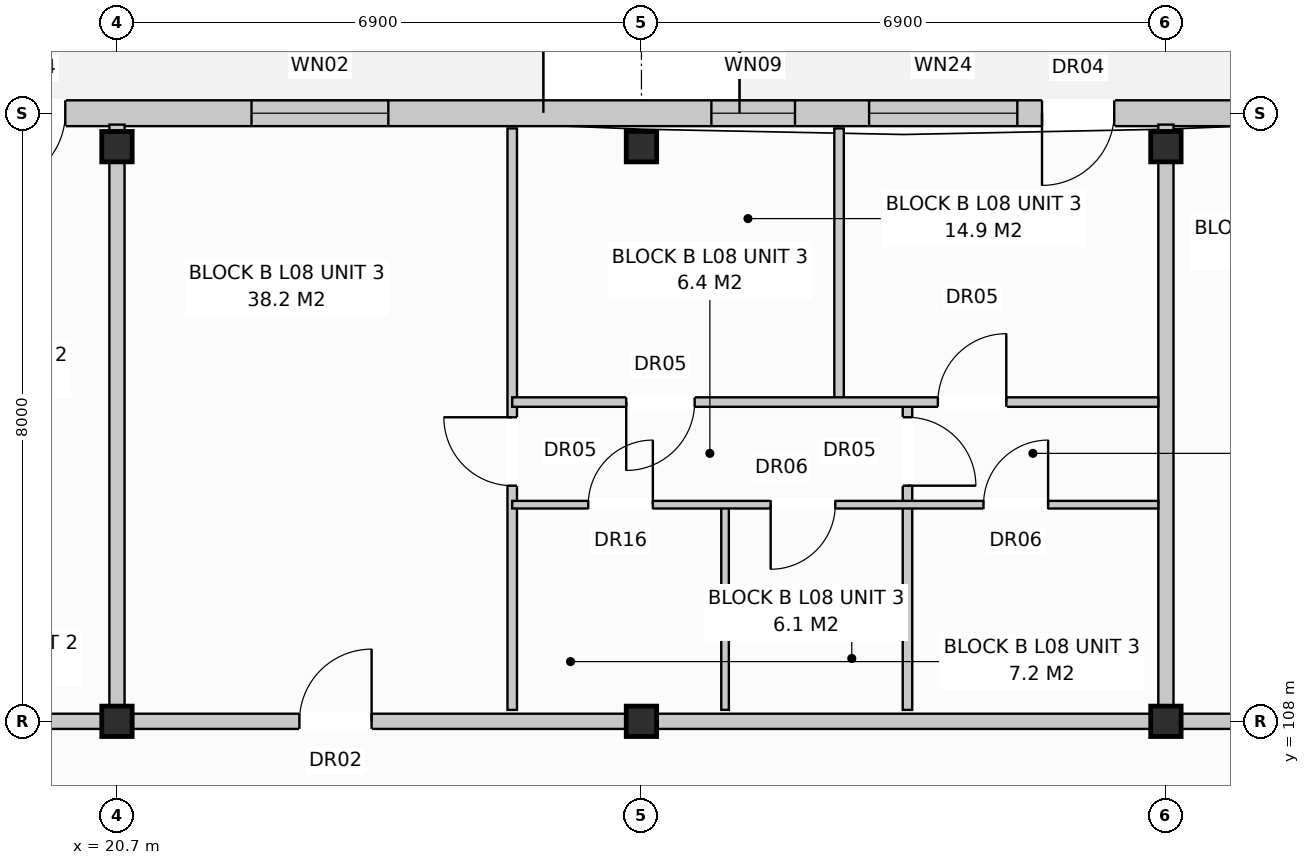
"""IFC4 building model, lengths in metres.
Left out: names, types, materials, properties, quantities, classifications, styles, units other than length and angle.
Written with IfcOpenShell. Run it as: python <this file> out.ifc"""

import sys

from ifc_helpers import new_model, si_unit, direction, frame, frame_2d, origin, origin_with_axes, origin_2d, place, context, subcontext, project, spatial, rectangle, extrude, element, fill, save


model = new_model("IFC4")
c1 = context("Model", 3, precision=1e-05, world=origin(), true_north=direction((0.0, 1.0)))
c2 = subcontext(c1, "Body", "Model", "MODEL_VIEW")
j1 = project(units=[si_unit("LENGTHUNIT", "METRE"), si_unit("PLANEANGLEUNIT", "RADIAN")], contexts=[c1])
p1 = place(None, origin())
s1 = spatial("IfcSite", under=j1, at=p1, CompositionType="ELEMENT")
p2 = place(p1, origin())
s2 = spatial("IfcBuilding", under=s1, at=p2, CompositionType="ELEMENT")
p3 = place(p2, frame((0.0, 0.0, 27.2)))
s3 = spatial("IfcBuildingStorey", under=s2, at=p3, CompositionType="ELEMENT", Elevation=27.2)
for number, where, z_axis, x_axis in (
    (1, (20.7, 108.0, 0.0), (0.0, 0.0, 1.0), (1.0, 0.0, 0.0)),
    (2, (20.7, 115.56, 0.0), (0.0, 0.0, 1.0), (1.0, 0.0, 0.0)),
    (3, (27.6, 108.0, 0.0), (0.0, 0.0, 1.0), (1.0, 0.0, 0.0)),
    (4, (27.6, 115.56, 0.0), (0.0, 0.0, 1.0), (1.0, 0.0, 0.0)),
    (5, (34.5, 108.0, 0.0), (0.0, 0.0, 1.0), (1.0, 0.0, 0.0)),
    (6, (34.5, 115.56, 0.0), (0.0, 0.0, 1.0), (1.0, 0.0, 0.0)),
):
    element("IfcColumn", number, at=place(p3, frame(where, z_axis=z_axis, x_axis=x_axis)), inside=s3, PredefinedType="COLUMN", context=c2, shape_type="SweptSolid", body=[
        extrude(rectangle(XDim=0.4, YDim=0.4, at=origin_2d()), origin(), (0.0, 0.0, 1.0), 3.2),
    ])
p4 = place(p3, frame((0.16, 116.0, 0.0), z_axis=(0.0, 0.0, 1.0), x_axis=(1.0, 0.0, 0.0)))
e7 = element("IfcWall", 7, at=p4, inside=s3, PredefinedType="STANDARD", context=c2, shape_type="SweptSolid", body=[
    extrude(rectangle(XDim=41.08, YDim=0.34, at=frame_2d((20.54, 0.0))), origin(), (0.0, 0.0, 1.0), 2.96),
])
p5 = place(p4, frame((2.5, 0.0, 0.0)))
e8 = element("IfcOpeningElement", 8, at=p5, cuts=e7, PredefinedType="OPENING", context=c2, shape_type="SweptSolid", body=[
    extrude(rectangle(XDim=0.95, YDim=2.1, at=frame_2d((0.475, 1.05))), frame((0.0, 0.182, 0.0), z_axis=(0.0, -1.0, 0.0), x_axis=(1.0, 0.0, 0.0)), (0.0, 0.0, 1.0), 0.364),
])
p6 = place(p4, frame((18.91, 0.0, 0.0)))
e9 = element("IfcOpeningElement", 9, at=p6, cuts=e7, PredefinedType="OPENING", context=c2, shape_type="SweptSolid", body=[
    extrude(rectangle(XDim=0.95, YDim=2.1, at=frame_2d((0.475, 1.05))), frame((0.0, 0.182, 0.0), z_axis=(0.0, -1.0, 0.0), x_axis=(1.0, 0.0, 0.0)), (0.0, 0.0, 1.0), 0.364),
])
p7 = place(p4, frame((32.71, 0.0, 0.0)))
e10 = element("IfcOpeningElement", 10, at=p7, cuts=e7, PredefinedType="OPENING", context=c2, shape_type="SweptSolid", body=[
    extrude(rectangle(XDim=0.95, YDim=2.1, at=frame_2d((0.475, 1.05))), frame((0.0, 0.182, 0.0), z_axis=(0.0, -1.0, 0.0), x_axis=(1.0, 0.0, 0.0)), (0.0, 0.0, 1.0), 0.364),
])
p8 = place(p4, frame((0.81, 0.0, 0.72)))
e11 = element("IfcOpeningElement", 11, at=p8, cuts=e7, PredefinedType="OPENING", context=c2, shape_type="SweptSolid", body=[
    extrude(rectangle(XDim=1.1, YDim=1.5, at=frame_2d((0.55, 0.75))), frame((0.0, 0.182, 0.0), z_axis=(0.0, -1.0, 0.0), x_axis=(1.0, 0.0, 0.0)), (0.0, 0.0, 1.0), 0.364),
])
p9 = place(p4, frame((4.235, 0.0, 0.8)))
e12 = element("IfcOpeningElement", 12, at=p9, cuts=e7, PredefinedType="OPENING", context=c2, shape_type="SweptSolid", body=[
    extrude(rectangle(XDim=1.95, YDim=1.65, at=frame_2d((0.975, 0.825))), frame((0.0, 0.182, 0.0), z_axis=(0.0, -1.0, 0.0), x_axis=(1.0, 0.0, 0.0)), (0.0, 0.0, 1.0), 0.364),
])
p10 = place(p4, frame((8.01, 0.0, 0.8)))
e13 = element("IfcOpeningElement", 13, at=p10, cuts=e7, PredefinedType="OPENING", context=c2, shape_type="SweptSolid", body=[
    extrude(rectangle(XDim=1.8, YDim=1.7, at=frame_2d((0.9, 0.85))), frame((0.0, 0.182, 0.0), z_axis=(0.0, -1.0, 0.0), x_axis=(1.0, 0.0, 0.0)), (0.0, 0.0, 1.0), 0.364),
])
p11 = place(p4, frame((11.66, 0.0, 0.72)))
e14 = element("IfcOpeningElement", 14, at=p11, cuts=e7, PredefinedType="OPENING", context=c2, shape_type="SweptSolid", body=[
    extrude(rectangle(XDim=1.1, YDim=1.5, at=frame_2d((0.55, 0.75))), frame((0.0, 0.182, 0.0), z_axis=(0.0, -1.0, 0.0), x_axis=(1.0, 0.0, 0.0)), (0.0, 0.0, 1.0), 0.364),
])
p12 = place(p4, frame((16.735, 0.0, 0.8)))
e15 = element("IfcOpeningElement", 15, at=p12, cuts=e7, PredefinedType="OPENING", context=c2, shape_type="SweptSolid", body=[
    extrude(rectangle(XDim=1.95, YDim=1.65, at=frame_2d((0.975, 0.825))), frame((0.0, 0.182, 0.0), z_axis=(0.0, -1.0, 0.0), x_axis=(1.0, 0.0, 0.0)), (0.0, 0.0, 1.0), 0.364),
])
p13 = place(p4, frame((22.31, 0.0, 0.8)))
e16 = element("IfcOpeningElement", 16, at=p13, cuts=e7, PredefinedType="OPENING", context=c2, shape_type="SweptSolid", body=[
    extrude(rectangle(XDim=1.8, YDim=1.7, at=frame_2d((0.9, 0.85))), frame((0.0, 0.182, 0.0), z_axis=(0.0, -1.0, 0.0), x_axis=(1.0, 0.0, 0.0)), (0.0, 0.0, 1.0), 0.364),
])
p14 = place(p4, frame((28.36, 0.0, 0.72)))
e17 = element("IfcOpeningElement", 17, at=p14, cuts=e7, PredefinedType="OPENING", context=c2, shape_type="SweptSolid", body=[
    extrude(rectangle(XDim=1.1, YDim=1.5, at=frame_2d((0.55, 0.75))), frame((0.0, 0.182, 0.0), z_axis=(0.0, -1.0, 0.0), x_axis=(1.0, 0.0, 0.0)), (0.0, 0.0, 1.0), 0.364),
])
p15 = place(p4, frame((30.435, 0.0, 0.8)))
e18 = element("IfcOpeningElement", 18, at=p15, cuts=e7, PredefinedType="OPENING", context=c2, shape_type="SweptSolid", body=[
    extrude(rectangle(XDim=1.95, YDim=1.65, at=frame_2d((0.975, 0.825))), frame((0.0, 0.182, 0.0), z_axis=(0.0, -1.0, 0.0), x_axis=(1.0, 0.0, 0.0)), (0.0, 0.0, 1.0), 0.364),
])
p16 = place(p4, frame((35.61, 0.0, 0.8)))
e19 = element("IfcOpeningElement", 19, at=p16, cuts=e7, PredefinedType="OPENING", context=c2, shape_type="SweptSolid", body=[
    extrude(rectangle(XDim=1.8, YDim=1.7, at=frame_2d((0.9, 0.85))), frame((0.0, 0.182, 0.0), z_axis=(0.0, -1.0, 0.0), x_axis=(1.0, 0.0, 0.0)), (0.0, 0.0, 1.0), 0.364),
])
p17 = place(p4, frame((39.26, 0.0, 0.72)))
e20 = element("IfcOpeningElement", 20, at=p17, cuts=e7, PredefinedType="OPENING", context=c2, shape_type="SweptSolid", body=[
    extrude(rectangle(XDim=1.1, YDim=1.5, at=frame_2d((0.55, 0.75))), frame((0.0, 0.182, 0.0), z_axis=(0.0, -1.0, 0.0), x_axis=(1.0, 0.0, 0.0)), (0.0, 0.0, 1.0), 0.364),
])
p18 = place(p3, frame((20.7, 108.15, 0.0), z_axis=(0.0, 0.0, 1.0), x_axis=(0.0, 1.0, 0.0)))
e21 = element("IfcWall", 21, at=p18, inside=s3, PredefinedType="PARTITIONING", context=c2, shape_type="SweptSolid", body=[
    extrude(rectangle(XDim=7.7, YDim=0.2, at=frame_2d((3.85, 0.0))), origin(), (0.0, 0.0, 1.0), 2.96),
])
p19 = place(p3, frame((6.9, 108.0, 0.0), z_axis=(0.0, 0.0, 1.0), x_axis=(1.0, 0.0, 0.0)))
e22 = element("IfcWall", 22, at=p19, inside=s3, PredefinedType="PARTITIONING", context=c2, shape_type="SweptSolid", body=[
    extrude(rectangle(XDim=13.8, YDim=0.2, at=frame_2d((6.9, 0.0))), origin(), (0.0, 0.0, 1.0), 2.4),
])
p20 = place(p19, frame((9.6, 0.0, 0.0)))
e23 = element("IfcOpeningElement", 23, at=p20, cuts=e22, PredefinedType="OPENING", context=c2, shape_type="SweptSolid", body=[
    extrude(rectangle(XDim=0.95, YDim=2.15, at=frame_2d((0.475, 1.075))), frame((0.0, 0.112, 0.0), z_axis=(0.0, -1.0, 0.0), x_axis=(1.0, 0.0, 0.0)), (0.0, 0.0, 1.0), 0.224),
])
p21 = place(p3, frame((34.5, 108.15, 0.0), z_axis=(0.0, 0.0, 1.0), x_axis=(0.0, 1.0, 0.0)))
e24 = element("IfcWall", 24, at=p21, inside=s3, PredefinedType="PARTITIONING", context=c2, shape_type="SweptSolid", body=[
    extrude(rectangle(XDim=7.7, YDim=0.2, at=frame_2d((3.85, 0.0))), origin(), (0.0, 0.0, 1.0), 2.4),
])
p22 = place(p3, frame((20.7, 108.0, 0.0), z_axis=(0.0, 0.0, 1.0), x_axis=(1.0, 0.0, 0.0)))
e25 = element("IfcWall", 25, at=p22, inside=s3, PredefinedType="PARTITIONING", context=c2, shape_type="SweptSolid", body=[
    extrude(rectangle(XDim=13.8, YDim=0.2, at=frame_2d((6.9, 0.0))), origin(), (0.0, 0.0, 1.0), 2.4),
])
p23 = place(p22, frame((2.4, 0.0, 0.0)))
e26 = element("IfcOpeningElement", 26, at=p23, cuts=e25, PredefinedType="OPENING", context=c2, shape_type="SweptSolid", body=[
    extrude(rectangle(XDim=0.95, YDim=2.15, at=frame_2d((0.475, 1.075))), frame((0.0, 0.112, 0.0), z_axis=(0.0, -1.0, 0.0), x_axis=(1.0, 0.0, 0.0)), (0.0, 0.0, 1.0), 0.224),
])
p24 = place(p3, frame((25.9, 108.15, 0.0), z_axis=(0.0, 0.0, 1.0), x_axis=(0.0, 1.0, 0.0)))
e27 = element("IfcWall", 27, at=p24, inside=s3, PredefinedType="PARTITIONING", context=c2, shape_type="SweptSolid", body=[
    extrude(rectangle(XDim=7.65, YDim=0.125, at=frame_2d((3.825, 0.0))), origin(), (0.0, 0.0, 1.0), 2.59),
])
p25 = place(p24, frame((2.95, 0.0, 0.0)))
e28 = element("IfcOpeningElement", 28, at=p25, cuts=e27, PredefinedType="OPENING", context=c2, shape_type="SweptSolid", body=[
    extrude(rectangle(XDim=0.9, YDim=2.1, at=frame_2d((0.45, 1.05))), frame((0.0, 0.074, 0.0), z_axis=(0.0, -1.0, 0.0), x_axis=(1.0, 0.0, 0.0)), (0.0, 0.0, 1.0), 0.149),
])
p26 = place(p3, frame((28.7, 108.15, 0.0), z_axis=(0.0, 0.0, 1.0), x_axis=(0.0, 1.0, 0.0)))
e29 = element("IfcWall", 29, at=p26, inside=s3, PredefinedType="PARTITIONING", context=c2, shape_type="SweptSolid", body=[
    extrude(rectangle(XDim=2.7, YDim=0.1, at=frame_2d((1.35, 0.0))), origin(), (0.0, 0.0, 1.0), 2.96),
])
p27 = place(p3, frame((31.1, 108.15, 0.0), z_axis=(0.0, 0.0, 1.0), x_axis=(0.0, 1.0, 0.0)))
e30 = element("IfcWall", 30, at=p27, inside=s3, PredefinedType="PARTITIONING", context=c2, shape_type="SweptSolid", body=[
    extrude(rectangle(XDim=4.05, YDim=0.125, at=frame_2d((2.025, 0.0))), origin(), (0.0, 0.0, 1.0), 2.96),
])
p28 = place(p27, frame((2.95, 0.0, 0.0)))
e31 = element("IfcOpeningElement", 31, at=p28, cuts=e30, PredefinedType="OPENING", context=c2, shape_type="SweptSolid", body=[
    extrude(rectangle(XDim=0.9, YDim=2.1, at=frame_2d((0.45, 1.05))), frame((0.0, 0.074, 0.0), z_axis=(0.0, -1.0, 0.0), x_axis=(1.0, 0.0, 0.0)), (0.0, 0.0, 1.0), 0.149),
])
p29 = place(p3, frame((30.2, 112.2, 0.0), z_axis=(0.0, 0.0, 1.0), x_axis=(0.0, 1.0, 0.0)))
e32 = element("IfcWall", 32, at=p29, inside=s3, PredefinedType="PARTITIONING", context=c2, shape_type="SweptSolid", body=[
    extrude(rectangle(XDim=3.6, YDim=0.125, at=frame_2d((1.8, 0.0))), origin(), (0.0, 0.0, 1.0), 2.96),
])
p30 = place(p3, frame((25.9, 110.85, 0.0), z_axis=(0.0, 0.0, 1.0), x_axis=(1.0, 0.0, 0.0)))
e33 = element("IfcWall", 33, at=p30, inside=s3, PredefinedType="PARTITIONING", context=c2, shape_type="SweptSolid", body=[
    extrude(rectangle(XDim=8.5, YDim=0.1, at=frame_2d((4.25, 0.0))), origin(), (0.0, 0.0, 1.0), 2.96),
])
p31 = place(p30, frame((1.0, 0.0, 0.0)))
e34 = element("IfcOpeningElement", 34, at=p31, cuts=e33, PredefinedType="OPENING", context=c2, shape_type="SweptSolid", body=[
    extrude(rectangle(XDim=0.85, YDim=2.1, at=frame_2d((0.425, 1.05))), frame((0.0, 0.062, 0.0), z_axis=(0.0, -1.0, 0.0), x_axis=(1.0, 0.0, 0.0)), (0.0, 0.0, 1.0), 0.124),
])
p32 = place(p30, frame((3.4, 0.0, 0.0)))
e35 = element("IfcOpeningElement", 35, at=p32, cuts=e33, PredefinedType="OPENING", context=c2, shape_type="SweptSolid", body=[
    extrude(rectangle(XDim=0.85, YDim=2.05, at=frame_2d((0.425, 1.025))), frame((0.0, 0.062, 0.0), z_axis=(0.0, -1.0, 0.0), x_axis=(1.0, 0.0, 0.0)), (0.0, 0.0, 1.0), 0.124),
])
p33 = place(p30, frame((6.2, 0.0, 0.0)))
e36 = element("IfcOpeningElement", 36, at=p33, cuts=e33, PredefinedType="OPENING", context=c2, shape_type="SweptSolid", body=[
    extrude(rectangle(XDim=0.85, YDim=2.05, at=frame_2d((0.425, 1.025))), frame((0.0, 0.062, 0.0), z_axis=(0.0, -1.0, 0.0), x_axis=(1.0, 0.0, 0.0)), (0.0, 0.0, 1.0), 0.124),
])
p34 = place(p3, frame((25.9, 112.2, 0.0), z_axis=(0.0, 0.0, 1.0), x_axis=(1.0, 0.0, 0.0)))
e37 = element("IfcWall", 37, at=p34, inside=s3, PredefinedType="PARTITIONING", context=c2, shape_type="SweptSolid", body=[
    extrude(rectangle(XDim=8.5, YDim=0.125, at=frame_2d((4.25, 0.0))), origin(), (0.0, 0.0, 1.0), 2.96),
])
p35 = place(p34, frame((1.5, 0.0, 0.0)))
e38 = element("IfcOpeningElement", 38, at=p35, cuts=e37, PredefinedType="OPENING", context=c2, shape_type="SweptSolid", body=[
    extrude(rectangle(XDim=0.9, YDim=2.1, at=frame_2d((0.45, 1.05))), frame((0.0, 0.074, 0.0), z_axis=(0.0, -1.0, 0.0), x_axis=(1.0, 0.0, 0.0)), (0.0, 0.0, 1.0), 0.149),
])
p36 = place(p34, frame((5.6, 0.0, 0.0)))
e39 = element("IfcOpeningElement", 39, at=p36, cuts=e37, PredefinedType="OPENING", context=c2, shape_type="SweptSolid", body=[
    extrude(rectangle(XDim=0.9, YDim=2.1, at=frame_2d((0.45, 1.05))), frame((0.0, 0.074, 0.0), z_axis=(0.0, -1.0, 0.0), x_axis=(1.0, 0.0, 0.0)), (0.0, 0.0, 1.0), 0.149),
])
p37 = place(p3, frame((34.5, 108.0, 0.0), z_axis=(0.0, 0.0, 1.0), x_axis=(1.0, 0.0, 0.0)))
e40 = element("IfcWall", 40, at=p37, inside=s3, PredefinedType="PARTITIONING", context=c2, shape_type="SweptSolid", body=[
    extrude(rectangle(XDim=6.9, YDim=0.2, at=frame_2d((3.45, 0.0))), origin(), (0.0, 0.0, 1.0), 2.4),
])
p38 = place(p37, frame((2.0, 0.0, 0.0)))
e41 = element("IfcOpeningElement", 41, at=p38, cuts=e40, PredefinedType="OPENING", context=c2, shape_type="SweptSolid", body=[
    extrude(rectangle(XDim=0.95, YDim=2.15, at=frame_2d((0.475, 1.075))), frame((0.0, 0.112, 0.0), z_axis=(0.0, -1.0, 0.0), x_axis=(1.0, 0.0, 0.0)), (0.0, 0.0, 1.0), 0.224),
])
p39 = place(p6, frame((0.95, 0.0, 0.0), z_axis=(0.0, 0.0, 1.0), x_axis=(-1.0, 0.0, 0.0)))
e42 = element("IfcDoor", 42, at=p39, inside=s3, OperationType="SINGLE_SWING_LEFT", PredefinedType="DOOR", context=c2, shape_type="SweptSolid", body=[
    extrude(rectangle(XDim=0.95, YDim=2.1, at=frame_2d((0.475, 1.05))), frame((0.0, 0.025, 0.0), z_axis=(0.0, -1.0, 0.0), x_axis=(1.0, 0.0, 0.0)), (0.0, 0.0, 1.0), 0.05),
])
fill(e9, e42)
p40 = place(p7, frame((0.95, 0.0, 0.0), z_axis=(0.0, 0.0, 1.0), x_axis=(-1.0, 0.0, 0.0)))
e43 = element("IfcDoor", 43, at=p40, inside=s3, OperationType="SINGLE_SWING_LEFT", PredefinedType="DOOR", context=c2, shape_type="SweptSolid", body=[
    extrude(rectangle(XDim=0.95, YDim=2.1, at=frame_2d((0.475, 1.05))), frame((0.0, 0.025, 0.0), z_axis=(0.0, -1.0, 0.0), x_axis=(1.0, 0.0, 0.0)), (0.0, 0.0, 1.0), 0.05),
])
fill(e10, e43)
p41 = place(p13, origin_with_axes())
e44 = element("IfcWindow", 44, at=p41, inside=s3, PartitioningType="SINGLE_PANEL", PredefinedType="WINDOW", context=c2, shape_type="SweptSolid", body=[
    extrude(rectangle(XDim=1.8, YDim=1.7, at=frame_2d((0.9, 0.85))), frame((0.0, 0.03, 0.0), z_axis=(0.0, -1.0, 0.0), x_axis=(1.0, 0.0, 0.0)), (0.0, 0.0, 1.0), 0.06),
])
fill(e16, e44)
p42 = place(p14, origin_with_axes())
e45 = element("IfcWindow", 45, at=p42, inside=s3, PartitioningType="SINGLE_PANEL", PredefinedType="WINDOW", context=c2, shape_type="SweptSolid", body=[
    extrude(rectangle(XDim=1.1, YDim=1.5, at=frame_2d((0.55, 0.75))), frame((0.0, 0.03, 0.0), z_axis=(0.0, -1.0, 0.0), x_axis=(1.0, 0.0, 0.0)), (0.0, 0.0, 1.0), 0.06),
])
fill(e17, e45)
p43 = place(p15, origin_with_axes())
e46 = element("IfcWindow", 46, at=p43, inside=s3, PartitioningType="SINGLE_PANEL", PredefinedType="WINDOW", context=c2, shape_type="SweptSolid", body=[
    extrude(rectangle(XDim=1.95, YDim=1.65, at=frame_2d((0.975, 0.825))), frame((0.0, 0.03, 0.0), z_axis=(0.0, -1.0, 0.0), x_axis=(1.0, 0.0, 0.0)), (0.0, 0.0, 1.0), 0.06),
])
fill(e18, e46)
p44 = place(p23, origin_with_axes())
e47 = element("IfcDoor", 47, at=p44, inside=s3, OperationType="SINGLE_SWING_RIGHT", PredefinedType="DOOR", context=c2, shape_type="SweptSolid", body=[
    extrude(rectangle(XDim=0.95, YDim=2.15, at=frame_2d((0.475, 1.075))), frame((0.0, 0.025, 0.0), z_axis=(0.0, -1.0, 0.0), x_axis=(1.0, 0.0, 0.0)), (0.0, 0.0, 1.0), 0.05),
])
fill(e26, e47)
p45 = place(p25, origin_with_axes())
e48 = element("IfcDoor", 48, at=p45, inside=s3, OperationType="SINGLE_SWING_RIGHT", PredefinedType="DOOR", context=c2, shape_type="SweptSolid", body=[
    extrude(rectangle(XDim=0.9, YDim=2.1, at=frame_2d((0.45, 1.05))), frame((0.0, 0.025, 0.0), z_axis=(0.0, -1.0, 0.0), x_axis=(1.0, 0.0, 0.0)), (0.0, 0.0, 1.0), 0.05),
])
fill(e28, e48)
p46 = place(p28, frame((0.9, 0.0, 0.0), z_axis=(0.0, 0.0, 1.0), x_axis=(-1.0, 0.0, 0.0)))
e49 = element("IfcDoor", 49, at=p46, inside=s3, OperationType="SINGLE_SWING_LEFT", PredefinedType="DOOR", context=c2, shape_type="SweptSolid", body=[
    extrude(rectangle(XDim=0.9, YDim=2.1, at=frame_2d((0.45, 1.05))), frame((0.0, 0.025, 0.0), z_axis=(0.0, -1.0, 0.0), x_axis=(1.0, 0.0, 0.0)), (0.0, 0.0, 1.0), 0.05),
])
fill(e31, e49)
p47 = place(p31, origin_with_axes())
e50 = element("IfcDoor", 50, at=p47, inside=s3, OperationType="SINGLE_SWING_RIGHT", PredefinedType="DOOR", context=c2, shape_type="SweptSolid", body=[
    extrude(rectangle(XDim=0.85, YDim=2.1, at=frame_2d((0.425, 1.05))), frame((0.0, 0.025, 0.0), z_axis=(0.0, -1.0, 0.0), x_axis=(1.0, 0.0, 0.0)), (0.0, 0.0, 1.0), 0.05),
])
fill(e34, e50)
p48 = place(p32, frame((0.85, 0.0, 0.0), z_axis=(0.0, 0.0, 1.0), x_axis=(-1.0, 0.0, 0.0)))
e51 = element("IfcDoor", 51, at=p48, inside=s3, OperationType="SINGLE_SWING_LEFT", PredefinedType="DOOR", context=c2, shape_type="SweptSolid", body=[
    extrude(rectangle(XDim=0.85, YDim=2.05, at=frame_2d((0.425, 1.025))), frame((0.0, 0.025, 0.0), z_axis=(0.0, -1.0, 0.0), x_axis=(1.0, 0.0, 0.0)), (0.0, 0.0, 1.0), 0.05),
])
fill(e35, e51)
p49 = place(p33, origin_with_axes())
e52 = element("IfcDoor", 52, at=p49, inside=s3, OperationType="SINGLE_SWING_RIGHT", PredefinedType="DOOR", context=c2, shape_type="SweptSolid", body=[
    extrude(rectangle(XDim=0.85, YDim=2.05, at=frame_2d((0.425, 1.025))), frame((0.0, 0.025, 0.0), z_axis=(0.0, -1.0, 0.0), x_axis=(1.0, 0.0, 0.0)), (0.0, 0.0, 1.0), 0.05),
])
fill(e36, e52)
p50 = place(p35, frame((0.9, 0.0, 0.0), z_axis=(0.0, 0.0, 1.0), x_axis=(-1.0, 0.0, 0.0)))
e53 = element("IfcDoor", 53, at=p50, inside=s3, OperationType="SINGLE_SWING_LEFT", PredefinedType="DOOR", context=c2, shape_type="SweptSolid", body=[
    extrude(rectangle(XDim=0.9, YDim=2.1, at=frame_2d((0.45, 1.05))), frame((0.0, 0.025, 0.0), z_axis=(0.0, -1.0, 0.0), x_axis=(1.0, 0.0, 0.0)), (0.0, 0.0, 1.0), 0.05),
])
fill(e38, e53)
p51 = place(p36, origin_with_axes())
e54 = element("IfcDoor", 54, at=p51, inside=s3, OperationType="SINGLE_SWING_RIGHT", PredefinedType="DOOR", context=c2, shape_type="SweptSolid", body=[
    extrude(rectangle(XDim=0.9, YDim=2.1, at=frame_2d((0.45, 1.05))), frame((0.0, 0.025, 0.0), z_axis=(0.0, -1.0, 0.0), x_axis=(1.0, 0.0, 0.0)), (0.0, 0.0, 1.0), 0.05),
])
fill(e39, e54)
save(model, sys.argv[1])
